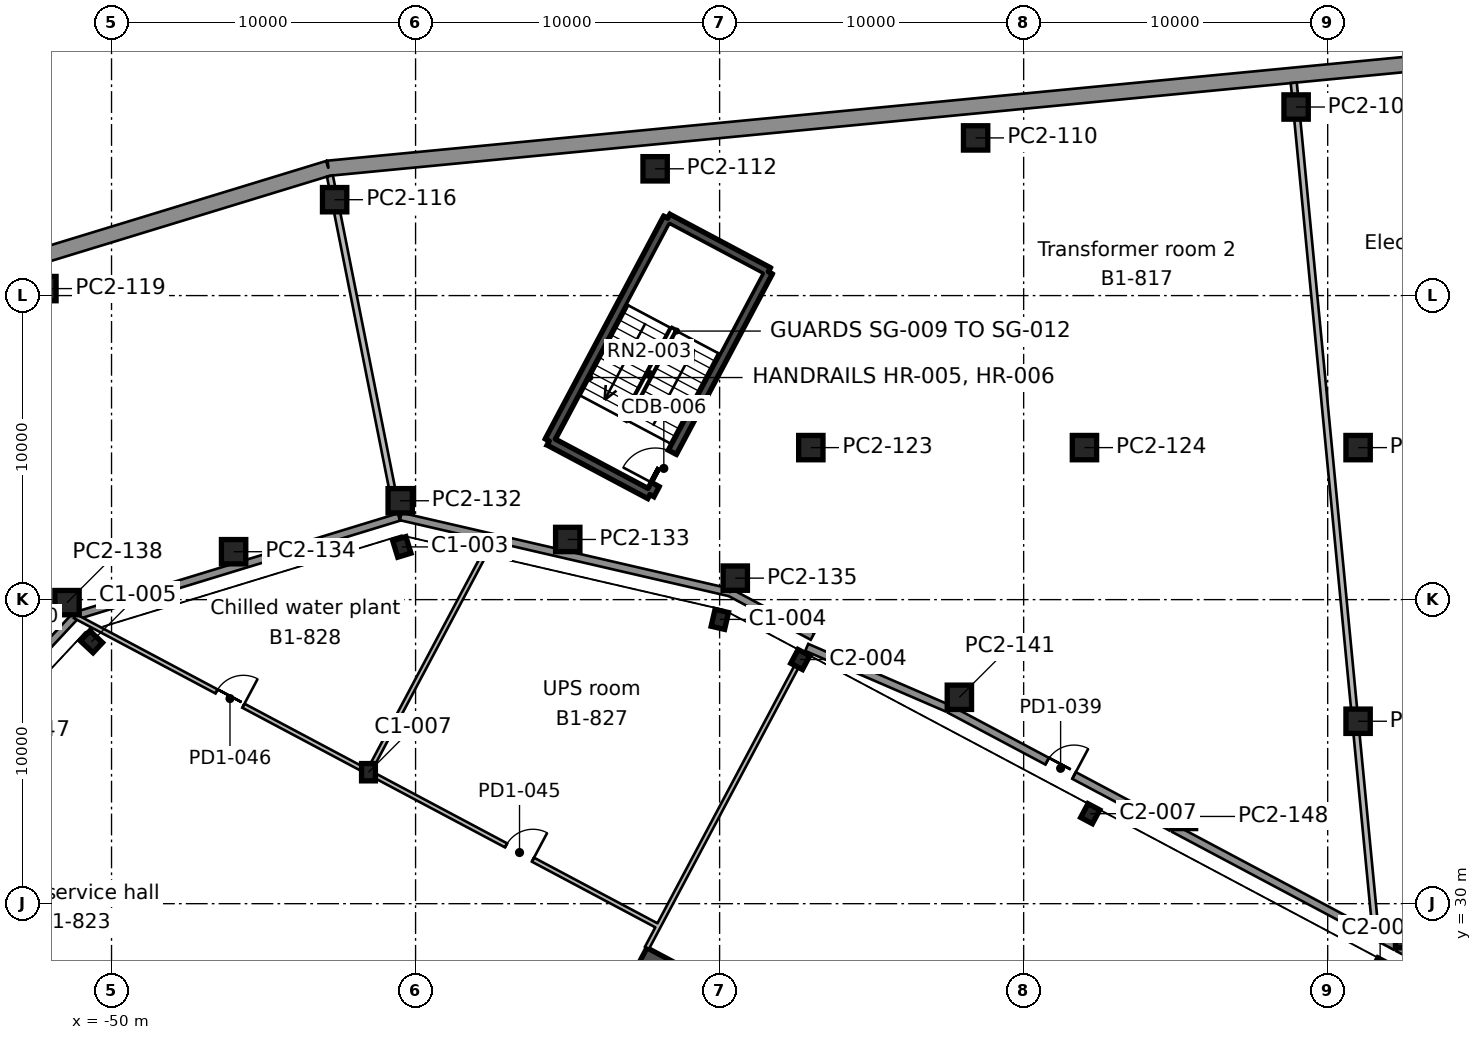
"""IFC4 building model, lengths in metres.
Left out: names, types, materials, properties, quantities, classifications, styles, units other than length and angle.
Written with IfcOpenShell. Run it as: python <this file> out.ifc"""

import sys

from ifc_helpers import new_model, si_unit, direction, frame, frame_2d, origin, origin_2d, place, context, subcontext, project, spatial, rectangle, i_section, extrude, element, fill, save


model = new_model("IFC4")
c1 = context("Model", 3, precision=1e-05, world=origin(), true_north=direction((0.0, 1.0)))
c2 = subcontext(c1, "Body", "Model", "MODEL_VIEW")
j1 = project(units=[si_unit("LENGTHUNIT", "METRE"), si_unit("PLANEANGLEUNIT", "RADIAN")], contexts=[c1])
p1 = place(None, origin())
s1 = spatial("IfcSite", under=j1, at=p1, CompositionType="ELEMENT")
p2 = place(p1, origin())
s2 = spatial("IfcBuilding", under=s1, at=p2, CompositionType="ELEMENT")
p3 = place(p2, frame((0.0, 0.0, -4.5)))
s3 = spatial("IfcBuildingStorey", under=s2, at=p3, CompositionType="ELEMENT", Elevation=-4.5)
for number, where, z_axis, x_axis in (
    (1, (-8.275, 27.89, 0.0), (0.0, 0.0, 1.0), (-0.883, 0.469, 0.0)),
    (2, (-17.811, 32.96, 0.0), (0.0, 0.0, 1.0), (-0.883, 0.469, 0.0)),
):
    element("IfcColumn", number, at=place(p3, frame(where, z_axis=z_axis, x_axis=x_axis)), inside=s3, PredefinedType="COLUMN", context=c2, shape_type="SweptSolid", body=[
        extrude(i_section(OverallWidth=0.437, OverallDepth=0.513, WebThickness=0.061, FlangeThickness=0.097, FilletRadius=0.015, at=origin_2d()), origin(), (0.0, 0.0, 1.0), 4.5),
    ])
p4 = place(p3, frame((-41.549, 34.324, 0.0), z_axis=(0.0, 0.0, 1.0), x_axis=(1.0, 0.0, 0.0)))
e3 = element("IfcColumn", 3, at=p4, inside=s3, PredefinedType="COLUMN", context=c2, shape_type="SweptSolid", body=[
    extrude(i_section(OverallWidth=0.455, OverallDepth=0.569, WebThickness=0.078, FlangeThickness=0.125, FilletRadius=0.015, at=origin_2d()), origin(), (0.0, 0.0, 1.0), 4.5),
])
p5 = place(p3, frame((-27.347, 38.03, 0.0), z_axis=(0.0, 0.0, 1.0), x_axis=(-0.882947592859, 0.469471562786, 0.0)))
e4 = element("IfcColumn", 4, at=p5, inside=s3, PredefinedType="COLUMN", context=c2, shape_type="SweptSolid", body=[
    extrude(i_section(OverallWidth=0.437, OverallDepth=0.513, WebThickness=0.061, FlangeThickness=0.097, FilletRadius=0.015, at=origin_2d()), origin(), (0.0, 0.0, 1.0), 4.5),
])
for number, where, z_axis, x_axis in (
    (5, (-50.66, 38.613, 0.0), (0.0, 0.0, 1.0), (-0.682, -0.731, 0.0)),
    (6, (-29.993, 39.35, 0.0), (0.0, 0.0, 1.0), (-0.974, 0.225, 0.0)),
    (7, (-40.452, 41.734, 0.0), (0.0, 0.0, 1.0), (-0.956, -0.292, 0.0)),
):
    element("IfcColumn", number, at=place(p3, frame(where, z_axis=z_axis, x_axis=x_axis)), inside=s3, PredefinedType="COLUMN", context=c2, shape_type="SweptSolid", body=[
        extrude(i_section(OverallWidth=0.455, OverallDepth=0.569, WebThickness=0.078, FlangeThickness=0.125, FilletRadius=0.015, at=origin_2d()), origin(), (0.0, 0.0, 1.0), 4.5),
    ])
p6 = place(p3, frame((-31.992, 28.336, 0.0), z_axis=(0.0, 0.0, 1.0), x_axis=(-0.46947084998, -0.882947971864, 0.0)))
e8 = element("IfcWall", 8, at=p6, inside=s3, PredefinedType="SHEAR", context=c2, shape_type="SweptSolid", body=[
    extrude(rectangle(XDim=20.0, YDim=0.9, at=frame_2d((10.0, 0.0))), origin(), (0.0, 0.0, 1.0), 4.5),
])
p7 = place(p6, frame((10.6, 0.0, 0.0)))
e9 = element("IfcOpeningElement", 9, at=p7, cuts=e8, PredefinedType="OPENING", context=c2, shape_type="SweptSolid", body=[
    extrude(rectangle(XDim=2.4, YDim=2.4, at=frame_2d((1.2, 1.2))), frame((0.0, 0.46, 0.0), z_axis=(0.0, -1.0, 0.0), x_axis=(1.0, 0.0, 0.0)), (0.0, 0.0, 1.0), 0.92),
])
p8 = place(p3, frame((-31.707, 52.544, 0.0), z_axis=(0.0, 0.0, 1.0), x_axis=(0.882948761726, -0.46946936446, 0.0)))
e10 = element("IfcWall", 10, at=p8, inside=s3, PredefinedType="SHEAR", context=c2, shape_type="SweptSolid", body=[
    extrude(rectangle(XDim=3.75, YDim=0.3, at=frame_2d((1.875, 0.0))), origin(), (0.0, 0.0, 1.0), 4.5),
])
p9 = place(p3, frame((-28.396, 50.784, 0.0), z_axis=(0.0, 0.0, 1.0), x_axis=(-0.469464178475, -0.882951519127, 0.0)))
e11 = element("IfcWall", 11, at=p9, inside=s3, PredefinedType="SHEAR", context=c2, shape_type="SweptSolid", body=[
    extrude(rectangle(XDim=8.3, YDim=0.3, at=frame_2d((4.15, 0.0))), origin(), (0.0, 0.0, 1.0), 4.5),
])
p10 = place(p9, frame((6.725, 0.0, 0.0)))
e12 = element("IfcOpeningElement", 12, at=p10, cuts=e11, PredefinedType="OPENING", context=c2, shape_type="SweptSolid", body=[
    extrude(rectangle(XDim=1.2, YDim=2.1, at=frame_2d((0.6, 1.05))), frame((0.0, 0.16, 0.0), z_axis=(0.0, -1.0, 0.0), x_axis=(1.0, 0.0, 0.0)), (0.0, 0.0, 1.0), 0.32),
])
p11 = place(p3, frame((-32.293, 43.456, 0.0), z_axis=(0.0, 0.0, 1.0), x_axis=(-0.882948761726, 0.46946936446, 0.0)))
e13 = element("IfcWall", 13, at=p11, inside=s3, PredefinedType="SHEAR", context=c2, shape_type="SweptSolid", body=[
    extrude(rectangle(XDim=3.75, YDim=0.3, at=frame_2d((1.875, 0.0))), origin(), (0.0, 0.0, 1.0), 4.5),
])
p12 = place(p3, frame((-35.604, 45.216, 0.0), z_axis=(0.0, 0.0, 1.0), x_axis=(0.469464178475, 0.882951519127, 0.0)))
e14 = element("IfcWall", 14, at=p12, inside=s3, PredefinedType="SHEAR", context=c2, shape_type="SweptSolid", body=[
    extrude(rectangle(XDim=8.3, YDim=0.3, at=frame_2d((4.15, 0.0))), origin(), (0.0, 0.0, 1.0), 4.5),
])
p13 = place(p3, frame((52.315, 63.363, 0.0), z_axis=(0.0, 0.0, 1.0), x_axis=(-0.995387233017, -0.095938815644, 0.0)))
e15 = element("IfcWall", 15, at=p13, inside=s3, PredefinedType="SOLIDWALL", context=c2, shape_type="SweptSolid", body=[
    extrude(rectangle(XDim=95.624, YDim=0.5, at=frame_2d((47.812, 0.0))), origin(), (0.0, 0.0, 1.0), 4.5),
])
p14 = place(p3, frame((-42.868, 54.189, 0.0), z_axis=(0.0, 0.0, 1.0), x_axis=(-0.956302408896, -0.292379381524, 0.0)))
e16 = element("IfcWall", 16, at=p14, inside=s3, PredefinedType="SOLIDWALL", context=c2, shape_type="SweptSolid", body=[
    extrude(rectangle(XDim=15.386, YDim=0.5, at=frame_2d((7.693, 0.0))), origin(), (0.0, 0.0, 1.0), 4.5),
])
for number, where, z_axis, x_axis in (
    (17, (-7.371, 28.949, 0.0), (0.0, 0.0, 1.0), (1.0, 0.0, 0.0)),
    (18, (-14.743, 32.869, 0.0), (0.0, 0.0, 1.0), (1.0, 0.0, 0.0)),
    (19, (-9.0, 36.0, 0.0), (0.0, 0.0, 1.0), (1.0, 0.0, 0.0)),
    (20, (-22.114, 36.788, 0.0), (0.0, 0.0, 1.0), (1.0, 0.0, 0.0)),
    (21, (-51.464, 39.901, 0.0), (0.0, 0.0, 1.0), (1.0, 0.0, 0.0)),
    (22, (-29.485, 40.707, 0.0), (0.0, 0.0, 1.0), (1.0, 0.0, 0.0)),
    (23, (-45.985, 41.576, 0.0), (0.0, 0.0, 1.0), (1.0, 0.0, 0.0)),
    (24, (-34.995, 41.979, 0.0), (0.0, 0.0, 1.0), (1.0, 0.0, 0.0)),
    (25, (-40.505, 43.252, 0.0), (0.0, 0.0, 1.0), (1.0, 0.0, 0.0)),
    (26, (-27.0, 45.0, 0.0), (0.0, 0.0, 1.0), (1.0, 0.0, 0.0)),
    (27, (-18.0, 45.0, 0.0), (0.0, 0.0, 1.0), (1.0, 0.0, 0.0)),
    (28, (-9.0, 45.0, 0.0), (0.0, 0.0, 1.0), (1.0, 0.0, 0.0)),
    (29, (-52.224, 50.23, 0.0), (0.0, 0.0, 1.0), (1.0, 0.0, 0.0)),
    (30, (-42.662, 53.154, 0.0), (0.0, 0.0, 1.0), (1.0, 0.0, 0.0)),
    (31, (-32.121, 54.17, 0.0), (0.0, 0.0, 1.0), (1.0, 0.0, 0.0)),
    (32, (-21.58, 55.186, 0.0), (0.0, 0.0, 1.0), (1.0, 0.0, 0.0)),
    (33, (-11.039, 56.202, 0.0), (0.0, 0.0, 1.0), (1.0, 0.0, 0.0)),
):
    element("IfcColumn", number, at=place(p3, frame(where, z_axis=z_axis, x_axis=x_axis)), inside=s3, PredefinedType="COLUMN", context=c2, shape_type="SweptSolid", body=[
        extrude(rectangle(XDim=0.8, YDim=0.8, at=origin_2d()), origin(), (0.0, 0.0, 1.0), 4.05),
    ])
p15 = place(p3, frame((-11.116, 56.998, 0.0), z_axis=(0.0, 0.0, 1.0), x_axis=(0.095794311802, -0.995401150203, 0.0)))
e34 = element("IfcWall", 34, at=p15, inside=s3, PredefinedType="PARTITIONING", context=c2, shape_type="SweptSolid", body=[
    extrude(rectangle(XDim=0.397, YDim=0.2, at=frame_2d((0.199, 0.0))), origin(), (0.0, 0.0, 1.0), 4.05),
])
p16 = place(p3, frame((-11.001, 55.802, 0.0), z_axis=(0.0, 0.0, 1.0), x_axis=(0.095942712783, -0.99538685739, 0.0)))
e35 = element("IfcWall", 35, at=p16, inside=s3, PredefinedType="PARTITIONING", context=c2, shape_type="SweptSolid", body=[
    extrude(rectangle(XDim=19.492, YDim=0.2, at=frame_2d((9.746, 0.0))), origin(), (0.0, 0.0, 1.0), 4.05),
])
p17 = place(p3, frame((-9.054, 35.6, 0.0), z_axis=(0.0, 0.0, 1.0), x_axis=(0.095939612703, -0.995387156193, 0.0)))
e36 = element("IfcWall", 36, at=p17, inside=s3, PredefinedType="PARTITIONING", context=c2, shape_type="SweptSolid", body=[
    extrude(rectangle(XDim=6.695, YDim=0.2, at=frame_2d((3.348, 0.0))), origin(), (0.0, 0.0, 1.0), 4.05),
])
p18 = place(p3, frame((-8.407, 28.933, 0.0), z_axis=(0.0, 0.0, 1.0), x_axis=(0.88302789325, -0.469320508547, 0.0)))
e37 = element("IfcWall", 37, at=p18, inside=s3, PredefinedType="SOLIDWALL", context=c2, shape_type="SweptSolid", body=[
    extrude(rectangle(XDim=0.72, YDim=0.25, at=frame_2d((0.36, 0.0))), origin(), (0.0, 0.0, 1.0), 4.05),
])
p19 = place(p3, frame((-7.684, 28.549, 0.0), z_axis=(0.0, 0.0, 1.0), x_axis=(0.882947828207, -0.46947112016, 0.0)))
e38 = element("IfcWall", 38, at=p19, inside=s3, PredefinedType="SOLIDWALL", context=c2, shape_type="SweptSolid", body=[
    extrude(rectangle(XDim=8.249, YDim=0.25, at=frame_2d((4.125, 0.0))), origin(), (0.0, 0.0, 1.0), 4.05),
])
p20 = place(p19, frame((3.625, 0.0, 0.0)))
e39 = element("IfcOpeningElement", 39, at=p20, cuts=e38, PredefinedType="OPENING", context=c2, shape_type="SweptSolid", body=[
    extrude(rectangle(XDim=1.0, YDim=2.1, at=frame_2d((0.5, 1.05))), frame((0.0, 0.135, 0.0), z_axis=(0.0, -1.0, 0.0), x_axis=(1.0, 0.0, 0.0)), (0.0, 0.0, 1.0), 0.27),
])
p21 = place(p3, frame((-42.817, 53.932, 0.0), z_axis=(0.0, 0.0, 1.0), x_axis=(0.194899081762, -0.980823301073, 0.0)))
e40 = element("IfcWall", 40, at=p21, inside=s3, PredefinedType="PARTITIONING", context=c2, shape_type="SweptSolid", body=[
    extrude(rectangle(XDim=0.386, YDim=0.2, at=frame_2d((0.193, 0.0))), origin(), (0.0, 0.0, 1.0), 4.05),
])
p22 = place(p3, frame((-42.583, 52.754, 0.0), z_axis=(0.0, 0.0, 1.0), x_axis=(0.195149741705, -0.980773459221, 0.0)))
e41 = element("IfcWall", 41, at=p22, inside=s3, PredefinedType="PARTITIONING", context=c2, shape_type="SweptSolid", body=[
    extrude(rectangle(XDim=9.28, YDim=0.2, at=frame_2d((4.64, 0.0))), origin(), (0.0, 0.0, 1.0), 4.05),
])
p23 = place(p3, frame((-37.45, 42.033, 0.0), z_axis=(0.0, 0.0, 1.0), x_axis=(0.97436957048, -0.224953195404, 0.0)))
e42 = element("IfcWall", 42, at=p23, inside=s3, PredefinedType="SOLIDWALL", context=c2, shape_type="SweptSolid", body=[
    extrude(rectangle(XDim=7.993, YDim=0.25, at=frame_2d((3.997, 0.0))), origin(), (0.0, 0.0, 1.0), 4.05),
])
p24 = place(p3, frame((-29.662, 40.235, 0.0), z_axis=(0.0, 0.0, 1.0), x_axis=(0.882951412921, -0.469464378224, 0.0)))
e43 = element("IfcWall", 43, at=p24, inside=s3, PredefinedType="SOLIDWALL", context=c2, shape_type="SweptSolid", body=[
    extrude(rectangle(XDim=3.079, YDim=0.25, at=frame_2d((1.54, 0.0))), origin(), (0.0, 0.0, 1.0), 4.05),
])
p25 = place(p3, frame((-40.487, 42.734, 0.0), z_axis=(0.0, 0.0, 1.0), x_axis=(0.974387235192, -0.224876668186, 0.0)))
e44 = element("IfcWall", 44, at=p25, inside=s3, PredefinedType="SOLIDWALL", context=c2, shape_type="SweptSolid", body=[
    extrude(rectangle(XDim=3.117, YDim=0.25, at=frame_2d((1.559, 0.0))), origin(), (0.0, 0.0, 1.0), 4.05),
])
p26 = place(p3, frame((-27.134, 38.43, 0.0), z_axis=(0.0, 0.0, 1.0), x_axis=(0.918029849315, -0.396511280756, 0.0)))
e45 = element("IfcWall", 45, at=p26, inside=s3, PredefinedType="SOLIDWALL", context=c2, shape_type="SweptSolid", body=[
    extrude(rectangle(XDim=5.033, YDim=0.25, at=frame_2d((2.517, 0.0))), origin(), (0.0, 0.0, 1.0), 4.05),
])
p27 = place(p3, frame((-22.427, 36.388, 0.0), z_axis=(0.0, 0.0, 1.0), x_axis=(0.882947828207, -0.46947112016, 0.0)))
e46 = element("IfcWall", 46, at=p27, inside=s3, PredefinedType="SOLIDWALL", context=c2, shape_type="SweptSolid", body=[
    extrude(rectangle(XDim=8.249, YDim=0.25, at=frame_2d((4.125, 0.0))), origin(), (0.0, 0.0, 1.0), 4.05),
])
p28 = place(p27, frame((3.625, 0.0, 0.0)))
e47 = element("IfcOpeningElement", 47, at=p28, cuts=e46, PredefinedType="OPENING", context=c2, shape_type="SweptSolid", body=[
    extrude(rectangle(XDim=1.0, YDim=2.1, at=frame_2d((0.5, 1.05))), frame((0.0, 0.135, 0.0), z_axis=(0.0, -1.0, 0.0), x_axis=(1.0, 0.0, 0.0)), (0.0, 0.0, 1.0), 0.27),
])
p29 = place(p3, frame((-15.056, 32.469, 0.0), z_axis=(0.0, 0.0, 1.0), x_axis=(0.882954463929, -0.469458639954, 0.0)))
e48 = element("IfcWall", 48, at=p29, inside=s3, PredefinedType="SOLIDWALL", context=c2, shape_type="SweptSolid", body=[
    extrude(rectangle(XDim=7.53, YDim=0.25, at=frame_2d((3.765, 0.0))), origin(), (0.0, 0.0, 1.0), 4.05),
])
p30 = place(p3, frame((-54.972, 35.405, 0.0), z_axis=(0.0, 0.0, 1.0), x_axis=(0.681862401645, 0.731480461273, 0.0)))
e49 = element("IfcWall", 49, at=p30, inside=s3, PredefinedType="SOLIDWALL", context=c2, shape_type="SweptSolid", body=[
    extrude(rectangle(XDim=5.535, YDim=0.25, at=frame_2d((2.768, 0.0))), origin(), (0.0, 0.0, 1.0), 4.05),
])
p31 = place(p30, frame((2.268, 0.0, 0.0)))
e50 = element("IfcOpeningElement", 50, at=p31, cuts=e49, PredefinedType="OPENING", context=c2, shape_type="SweptSolid", body=[
    extrude(rectangle(XDim=1.0, YDim=2.1, at=frame_2d((0.5, 1.05))), frame((0.0, 0.135, 0.0), z_axis=(0.0, -1.0, 0.0), x_axis=(1.0, 0.0, 0.0)), (0.0, 0.0, 1.0), 0.27),
])
p32 = place(p3, frame((-51.19, 39.462, 0.0), z_axis=(0.0, 0.0, 1.0), x_axis=(0.956306774144, 0.29236510347, 0.0)))
e51 = element("IfcWall", 51, at=p32, inside=s3, PredefinedType="SOLIDWALL", context=c2, shape_type="SweptSolid", body=[
    extrude(rectangle(XDim=11.13, YDim=0.25, at=frame_2d((5.565, 0.0))), origin(), (0.0, 0.0, 1.0), 4.05),
])
p33 = place(p3, frame((-32.013, 29.254, 0.0), z_axis=(0.0, 0.0, 1.0), x_axis=(-0.882951328121, 0.469464537713, 0.0)))
e52 = element("IfcWall", 52, at=p33, inside=s3, PredefinedType="PARTITIONING", context=c2, shape_type="SweptSolid", body=[
    extrude(rectangle(XDim=10.502, YDim=0.15, at=frame_2d((5.251, 0.0))), origin(), (0.0, 0.0, 1.0), 4.05),
])
p34 = place(p33, frame((4.673, 0.0, 0.0)))
e53 = element("IfcOpeningElement", 53, at=p34, cuts=e52, PredefinedType="OPENING", context=c2, shape_type="SweptSolid", body=[
    extrude(rectangle(XDim=1.0, YDim=2.1, at=frame_2d((0.5, 1.05))), frame((0.0, 0.085, 0.0), z_axis=(0.0, -1.0, 0.0), x_axis=(1.0, 0.0, 0.0)), (0.0, 0.0, 1.0), 0.17),
])
p35 = place(p3, frame((-41.812, 34.463, 0.0), z_axis=(0.0, 0.0, 1.0), x_axis=(-0.882945529205, 0.469475443935, 0.0)))
e54 = element("IfcWall", 54, at=p35, inside=s3, PredefinedType="PARTITIONING", context=c2, shape_type="SweptSolid", body=[
    extrude(rectangle(XDim=9.569, YDim=0.15, at=frame_2d((4.784, 0.0))), origin(), (0.0, 0.0, 1.0), 4.05),
])
p36 = place(p35, frame((4.362, 0.0, 0.0)))
e55 = element("IfcOpeningElement", 55, at=p36, cuts=e54, PredefinedType="OPENING", context=c2, shape_type="SweptSolid", body=[
    extrude(rectangle(XDim=1.0, YDim=2.1, at=frame_2d((0.5, 1.05))), frame((0.0, 0.085, 0.0), z_axis=(0.0, -1.0, 0.0), x_axis=(1.0, 0.0, 0.0)), (0.0, 0.0, 1.0), 0.17),
])
p37 = place(p3, frame((-50.26, 38.956, 0.0), z_axis=(0.0, 0.0, 1.0), x_axis=(-0.882925119508, 0.469513826572, 0.0)))
e56 = element("IfcWall", 56, at=p37, inside=s3, PredefinedType="PARTITIONING", context=c2, shape_type="SweptSolid", body=[
    extrude(rectangle(XDim=1.062, YDim=0.15, at=frame_2d((0.531, 0.0))), origin(), (0.0, 0.0, 1.0), 4.05),
])
p38 = place(p3, frame((-32.389, 28.547, 0.0), z_axis=(0.0, 0.0, 1.0), x_axis=(0.469582372655, 0.882888665287, 0.0)))
e57 = element("IfcWall", 57, at=p38, inside=s3, PredefinedType="PARTITIONING", context=c2, shape_type="SweptSolid", body=[
    extrude(rectangle(XDim=0.794, YDim=0.15, at=frame_2d((0.397, 0.0))), origin(), (0.0, 0.0, 1.0), 4.05),
])
p39 = place(p3, frame((-37.45, 42.033, 0.0), z_axis=(0.0, 0.0, 1.0), x_axis=(-0.46946644805, -0.882950312393, 0.0)))
e58 = element("IfcWall", 58, at=p39, inside=s3, PredefinedType="PARTITIONING", context=c2, shape_type="SweptSolid", body=[
    extrude(rectangle(XDim=8.373, YDim=0.15, at=frame_2d((4.187, 0.0))), origin(), (0.0, 0.0, 1.0), 4.05),
])
p40 = place(p3, frame((-32.015, 29.25, 0.0), z_axis=(0.0, 0.0, 1.0), x_axis=(0.469462919124, 0.882952188721, 0.0)))
e59 = element("IfcWall", 59, at=p40, inside=s3, PredefinedType="PARTITIONING", context=c2, shape_type="SweptSolid", body=[
    extrude(rectangle(XDim=9.687, YDim=0.15, at=frame_2d((4.844, 0.0))), origin(), (0.0, 0.0, 1.0), 4.05),
])
p41 = place(p10, frame((1.2, 0.0, 0.0), z_axis=(0.0, 0.0, 1.0), x_axis=(-1.0, 0.0, 0.0)))
e60 = element("IfcDoor", 60, at=p41, inside=s3, OperationType="SINGLE_SWING_LEFT", PredefinedType="DOOR", context=c2, shape_type="SweptSolid", body=[
    extrude(rectangle(XDim=1.2, YDim=2.1, at=frame_2d((0.6, 1.05))), frame((0.0, 0.025, 0.0), z_axis=(0.0, -1.0, 0.0), x_axis=(1.0, 0.0, 0.0)), (0.0, 0.0, 1.0), 0.05),
])
fill(e12, e60)
p42 = place(p34, frame((1.0, 0.0, 0.0), z_axis=(0.0, 0.0, 1.0), x_axis=(-1.0, 0.0, 0.0)))
e61 = element("IfcDoor", 61, at=p42, inside=s3, OperationType="SINGLE_SWING_RIGHT", PredefinedType="DOOR", context=c2, shape_type="SweptSolid", body=[
    extrude(rectangle(XDim=1.0, YDim=2.1, at=frame_2d((0.5, 1.05))), frame((0.0, 0.025, 0.0), z_axis=(0.0, -1.0, 0.0), x_axis=(1.0, 0.0, 0.0)), (0.0, 0.0, 1.0), 0.05),
])
fill(e53, e61)
p43 = place(p36, frame((1.0, 0.0, 0.0), z_axis=(0.0, 0.0, 1.0), x_axis=(-1.0, 0.0, 0.0)))
e62 = element("IfcDoor", 62, at=p43, inside=s3, OperationType="SINGLE_SWING_RIGHT", PredefinedType="DOOR", context=c2, shape_type="SweptSolid", body=[
    extrude(rectangle(XDim=1.0, YDim=2.1, at=frame_2d((0.5, 1.05))), frame((0.0, 0.025, 0.0), z_axis=(0.0, -1.0, 0.0), x_axis=(1.0, 0.0, 0.0)), (0.0, 0.0, 1.0), 0.05),
])
fill(e55, e62)
p44 = place(p28, origin())
e63 = element("IfcDoor", 63, at=p44, inside=s3, OperationType="SINGLE_SWING_RIGHT", PredefinedType="DOOR", context=c2, shape_type="SweptSolid", body=[
    extrude(rectangle(XDim=1.0, YDim=2.1, at=frame_2d((0.5, 1.05))), frame((0.0, 0.025, 0.0), z_axis=(0.0, -1.0, 0.0), x_axis=(1.0, 0.0, 0.0)), (0.0, 0.0, 1.0), 0.05),
])
fill(e47, e63)
save(model, sys.argv[1])
